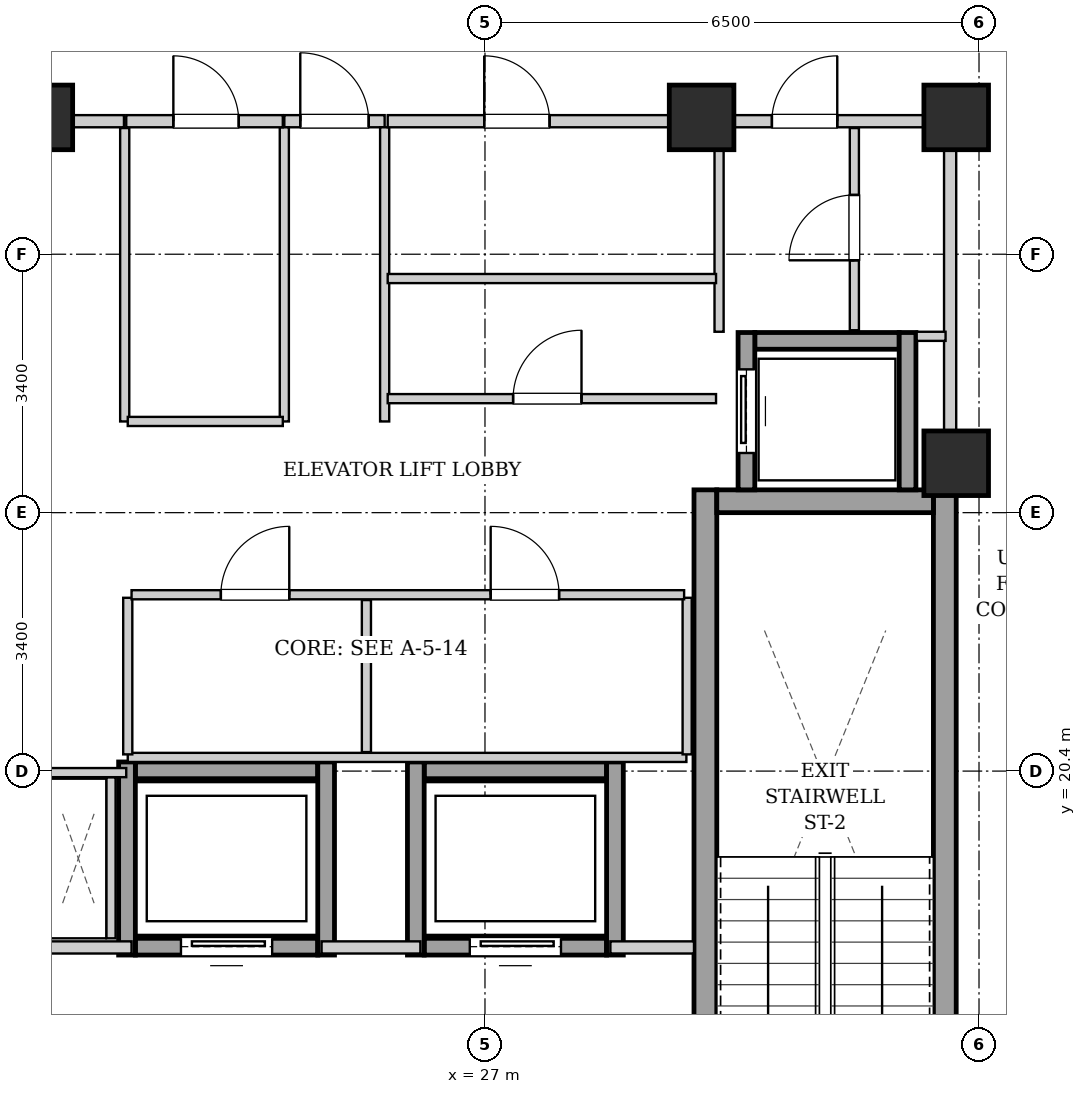
"""IFC4 building model, lengths in metres.
Left out: names, types, materials, properties, quantities, classifications, styles, units other than length and angle.
Written with IfcOpenShell. Run it as: python <this file> out.ifc"""

import sys

from ifc_helpers import new_model, si_unit, direction, frame, frame_2d, origin, origin_2d, place, context, subcontext, project, spatial, rectangle, extrude, element, fill, save


model = new_model("IFC4")
c1 = context("Model", 3, precision=1e-05, world=origin(), true_north=direction((0.0, 1.0)))
c2 = subcontext(c1, "Body", "Model", "MODEL_VIEW")
j1 = project(units=[si_unit("LENGTHUNIT", "METRE"), si_unit("PLANEANGLEUNIT", "RADIAN")], contexts=[c1])
p1 = place(None, origin())
s1 = spatial("IfcSite", under=j1, at=p1, CompositionType="ELEMENT")
p2 = place(p1, origin())
s2 = spatial("IfcBuilding", under=s1, at=p2, CompositionType="ELEMENT")
p3 = place(p2, frame((0.0, 0.0, 210.7)))
s3 = spatial("IfcBuildingStorey", under=s2, at=p3, CompositionType="ELEMENT", Elevation=210.7)
for number, where, z_axis, x_axis in (
    (1, (21.15, 29.0, 0.0), (0.0, 0.0, 1.0), (1.0, 0.0, 0.0)),
    (2, (29.85, 29.0, 0.0), (0.0, 0.0, 1.0), (1.0, 0.0, 0.0)),
    (3, (33.2, 29.0, 0.0), (0.0, 0.0, 1.0), (1.0, 0.0, 0.0)),
    (4, (33.2, 24.45, 0.0), (0.0, 0.0, 1.0), (1.0, 0.0, 0.0)),
):
    element("IfcColumn", number, at=place(p3, frame(where, z_axis=z_axis, x_axis=x_axis)), inside=s3, PredefinedType="COLUMN", context=c2, shape_type="SweptSolid", body=[
        extrude(rectangle(XDim=0.85, YDim=0.85, at=origin_2d()), origin(), (0.0, 0.0, 1.0), 3.3),
    ])
for number, where, z_axis, x_axis in (
    (5, (29.9, 15.1, 0.0), (0.0, 0.0, 1.0), (0.0, 1.0, 0.0)),
    (6, (33.05, 15.1, 0.0), (0.0, 0.0, 1.0), (0.0, 1.0, 0.0)),
):
    element("IfcWall", number, at=place(p3, frame(where, z_axis=z_axis, x_axis=x_axis)), inside=s3, PredefinedType="SHEAR", context=c2, shape_type="SweptSolid", body=[
        extrude(rectangle(XDim=9.0, YDim=0.3, at=frame_2d((4.5, 0.0))), origin(), (0.0, 0.0, 1.0), 3.04),
    ])
p4 = place(p3, frame((30.05, 23.95, 0.0), z_axis=(0.0, 0.0, 1.0), x_axis=(1.0, 0.0, 0.0)))
e7 = element("IfcWall", 7, at=p4, inside=s3, PredefinedType="SHEAR", context=c2, shape_type="SweptSolid", body=[
    extrude(rectangle(XDim=2.85, YDim=0.3, at=frame_2d((1.425, 0.0))), origin(), (0.0, 0.0, 1.0), 3.04),
])
p5 = place(p3, frame((30.55, 26.06, 0.0), z_axis=(0.0, 0.0, 1.0), x_axis=(1.0, 0.0, 0.0)))
e8 = element("IfcWall", 8, at=p5, inside=s3, PredefinedType="SHEAR", context=c2, shape_type="SweptSolid", body=[
    extrude(rectangle(XDim=1.9, YDim=0.22, at=frame_2d((0.95, 0.0))), origin(), (0.0, 0.0, 1.0), 3.04),
])
p6 = place(p3, frame((30.44, 24.1, 0.0), z_axis=(0.0, 0.0, 1.0), x_axis=(0.0, 1.0, 0.0)))
e9 = element("IfcWall", 9, at=p6, inside=s3, PredefinedType="SHEAR", context=c2, shape_type="SweptSolid", body=[
    extrude(rectangle(XDim=2.07, YDim=0.22, at=frame_2d((1.035, 0.0))), origin(), (0.0, 0.0, 1.0), 3.04),
])
p7 = place(p6, frame((0.485, 0.0, 0.0)))
e10 = element("IfcOpeningElement", 10, at=p7, cuts=e9, PredefinedType="OPENING", context=c2, shape_type="SweptSolid", body=[
    extrude(rectangle(XDim=1.1, YDim=2.15, at=frame_2d((0.55, 1.075))), frame((0.0, 0.12, 0.0), z_axis=(0.0, -1.0, 0.0), x_axis=(1.0, 0.0, 0.0)), (0.0, 0.0, 1.0), 0.24),
])
p8 = place(p3, frame((32.56, 24.1, 0.0), z_axis=(0.0, 0.0, 1.0), x_axis=(0.0, 1.0, 0.0)))
e11 = element("IfcWall", 11, at=p8, inside=s3, PredefinedType="SHEAR", context=c2, shape_type="SweptSolid", body=[
    extrude(rectangle(XDim=2.07, YDim=0.22, at=frame_2d((1.035, 0.0))), origin(), (0.0, 0.0, 1.0), 3.04),
])
p9 = place(p3, frame((22.4, 18.09, 0.0), z_axis=(0.0, 0.0, 1.0), x_axis=(1.0, 0.0, 0.0)))
e12 = element("IfcWall", 12, at=p9, inside=s3, PredefinedType="SHEAR", context=c2, shape_type="SweptSolid", body=[
    extrude(rectangle(XDim=2.4, YDim=0.22, at=frame_2d((1.2, 0.0))), origin(), (0.0, 0.0, 1.0), 3.04),
])
p10 = place(p9, frame((0.6, 0.0, 0.0)))
e13 = element("IfcOpeningElement", 13, at=p10, cuts=e12, PredefinedType="OPENING", context=c2, shape_type="SweptSolid", body=[
    extrude(rectangle(XDim=1.2, YDim=2.15, at=frame_2d((0.6, 1.075))), frame((0.0, 0.12, 0.0), z_axis=(0.0, -1.0, 0.0), x_axis=(1.0, 0.0, 0.0)), (0.0, 0.0, 1.0), 0.24),
])
p11 = place(p3, frame((22.4, 20.41, 0.0), z_axis=(0.0, 0.0, 1.0), x_axis=(1.0, 0.0, 0.0)))
e14 = element("IfcWall", 14, at=p11, inside=s3, PredefinedType="SHEAR", context=c2, shape_type="SweptSolid", body=[
    extrude(rectangle(XDim=2.4, YDim=0.22, at=frame_2d((1.2, 0.0))), origin(), (0.0, 0.0, 1.0), 3.04),
])
for number, where, z_axis, x_axis in (
    (15, (22.29, 17.98, 0.0), (0.0, 0.0, 1.0), (0.0, 1.0, 0.0)),
    (16, (24.91, 17.98, 0.0), (0.0, 0.0, 1.0), (0.0, 1.0, 0.0)),
):
    element("IfcWall", number, at=place(p3, frame(where, z_axis=z_axis, x_axis=x_axis)), inside=s3, PredefinedType="SHEAR", context=c2, shape_type="SweptSolid", body=[
        extrude(rectangle(XDim=2.54, YDim=0.22, at=frame_2d((1.27, 0.0))), origin(), (0.0, 0.0, 1.0), 3.04),
    ])
p12 = place(p3, frame((26.2, 18.09, 0.0), z_axis=(0.0, 0.0, 1.0), x_axis=(1.0, 0.0, 0.0)))
e17 = element("IfcWall", 17, at=p12, inside=s3, PredefinedType="SHEAR", context=c2, shape_type="SweptSolid", body=[
    extrude(rectangle(XDim=2.4, YDim=0.22, at=frame_2d((1.2, 0.0))), origin(), (0.0, 0.0, 1.0), 3.04),
])
p13 = place(p12, frame((0.6, 0.0, 0.0)))
e18 = element("IfcOpeningElement", 18, at=p13, cuts=e17, PredefinedType="OPENING", context=c2, shape_type="SweptSolid", body=[
    extrude(rectangle(XDim=1.2, YDim=2.15, at=frame_2d((0.6, 1.075))), frame((0.0, 0.12, 0.0), z_axis=(0.0, -1.0, 0.0), x_axis=(1.0, 0.0, 0.0)), (0.0, 0.0, 1.0), 0.24),
])
p14 = place(p3, frame((26.2, 20.41, 0.0), z_axis=(0.0, 0.0, 1.0), x_axis=(1.0, 0.0, 0.0)))
e19 = element("IfcWall", 19, at=p14, inside=s3, PredefinedType="SHEAR", context=c2, shape_type="SweptSolid", body=[
    extrude(rectangle(XDim=2.4, YDim=0.22, at=frame_2d((1.2, 0.0))), origin(), (0.0, 0.0, 1.0), 3.04),
])
for number, where, z_axis, x_axis in (
    (20, (26.09, 17.98, 0.0), (0.0, 0.0, 1.0), (0.0, 1.0, 0.0)),
    (21, (28.71, 17.98, 0.0), (0.0, 0.0, 1.0), (0.0, 1.0, 0.0)),
):
    element("IfcWall", number, at=place(p3, frame(where, z_axis=z_axis, x_axis=x_axis)), inside=s3, PredefinedType="SHEAR", context=c2, shape_type="SweptSolid", body=[
        extrude(rectangle(XDim=2.54, YDim=0.22, at=frame_2d((1.27, 0.0))), origin(), (0.0, 0.0, 1.0), 3.04),
    ])
p15 = place(p3, frame((21.25, 18.08, 0.0), z_axis=(0.0, 0.0, 1.0), x_axis=(1.0, 0.0, 0.0)))
e22 = element("IfcWall", 22, at=p15, inside=s3, PredefinedType="PARTITIONING", context=c2, shape_type="SweptSolid", body=[
    extrude(rectangle(XDim=1.1, YDim=0.16, at=frame_2d((0.55, 0.0))), origin(), (0.0, 0.0, 1.0), 3.04),
])
p16 = place(p3, frame((24.85, 18.08, 0.0), z_axis=(0.0, 0.0, 1.0), x_axis=(1.0, 0.0, 0.0)))
e23 = element("IfcWall", 23, at=p16, inside=s3, PredefinedType="PARTITIONING", context=c2, shape_type="SweptSolid", body=[
    extrude(rectangle(XDim=1.3, YDim=0.16, at=frame_2d((0.65, 0.0))), origin(), (0.0, 0.0, 1.0), 3.04),
])
p17 = place(p3, frame((28.65, 18.08, 0.0), z_axis=(0.0, 0.0, 1.0), x_axis=(1.0, 0.0, 0.0)))
e24 = element("IfcWall", 24, at=p17, inside=s3, PredefinedType="PARTITIONING", context=c2, shape_type="SweptSolid", body=[
    extrude(rectangle(XDim=1.1, YDim=0.16, at=frame_2d((0.55, 0.0))), origin(), (0.0, 0.0, 1.0), 3.04),
])
p18 = place(p3, frame((33.12, 24.12, 0.0), z_axis=(0.0, 0.0, 1.0), x_axis=(0.0, 1.0, 0.0)))
e25 = element("IfcWall", 25, at=p18, inside=s3, PredefinedType="PARTITIONING", context=c2, shape_type="SweptSolid", body=[
    extrude(rectangle(XDim=4.76, YDim=0.16, at=frame_2d((2.38, 0.0))), origin(), (0.0, 0.0, 1.0), 3.04),
])
p19 = place(p3, frame((24.36, 28.95, 0.0), z_axis=(0.0, 0.0, 1.0), x_axis=(1.0, 0.0, 0.0)))
e26 = element("IfcWall", 26, at=p19, inside=s3, PredefinedType="PARTITIONING", context=c2, shape_type="SweptSolid", body=[
    extrude(rectangle(XDim=1.32, YDim=0.16, at=frame_2d((0.66, 0.0))), origin(), (0.0, 0.0, 1.0), 2.556),
])
p20 = place(p19, frame((0.21, 0.0, 0.0)))
e27 = element("IfcOpeningElement", 27, at=p20, cuts=e26, PredefinedType="OPENING", context=c2, shape_type="SweptSolid", body=[
    extrude(rectangle(XDim=0.9, YDim=2.05, at=frame_2d((0.45, 1.025))), frame((0.0, 0.09, 0.0), z_axis=(0.0, -1.0, 0.0), x_axis=(1.0, 0.0, 0.0)), (0.0, 0.0, 1.0), 0.18),
])
p21 = place(p3, frame((17.96, 28.95, 0.0), z_axis=(0.0, 0.0, 1.0), x_axis=(1.0, 0.0, 0.0)))
e28 = element("IfcWall", 28, at=p21, inside=s3, PredefinedType="PARTITIONING", context=c2, shape_type="SweptSolid", body=[
    extrude(rectangle(XDim=4.29, YDim=0.16, at=frame_2d((2.145, 0.0))), origin(), (0.0, 0.0, 1.0), 2.556),
])
p22 = place(p21, frame((1.715, 0.0, 0.0)))
e29 = element("IfcOpeningElement", 29, at=p22, cuts=e28, PredefinedType="OPENING", context=c2, shape_type="SweptSolid", body=[
    extrude(rectangle(XDim=0.86, YDim=2.05, at=frame_2d((0.43, 1.025))), frame((0.0, 0.09, 0.0), z_axis=(0.0, -1.0, 0.0), x_axis=(1.0, 0.0, 0.0)), (0.0, 0.0, 1.0), 0.18),
])
p23 = place(p3, frame((22.08, 18.2, 0.0), z_axis=(0.0, 0.0, 1.0), x_axis=(0.0, 1.0, 0.0)))
e30 = element("IfcWall", 30, at=p23, inside=s3, PredefinedType="PARTITIONING", context=c2, shape_type="SweptSolid", body=[
    extrude(rectangle(XDim=2.12, YDim=0.12, at=frame_2d((1.06, 0.0))), origin(), (0.0, 0.0, 1.0), 3.04),
])
p24 = place(p3, frame((22.28, 20.38, 0.0), z_axis=(0.0, 0.0, 1.0), x_axis=(-1.0, 0.0, 0.0)))
e31 = element("IfcWall", 31, at=p24, inside=s3, PredefinedType="PARTITIONING", context=c2, shape_type="SweptSolid", body=[
    extrude(rectangle(XDim=1.02, YDim=0.12, at=frame_2d((0.51, 0.0))), origin(), (0.0, 0.0, 1.0), 3.04),
])
for number, where, z_axis, x_axis in (
    (32, (24.36, 25.0, 0.0), (0.0, 0.0, 1.0), (0.0, 1.0, 0.0)),
    (33, (25.68, 25.0, 0.0), (0.0, 0.0, 1.0), (0.0, 1.0, 0.0)),
):
    element("IfcWall", number, at=place(p3, frame(where, z_axis=z_axis, x_axis=x_axis)), inside=s3, PredefinedType="PARTITIONING", context=c2, shape_type="SweptSolid", body=[
        extrude(rectangle(XDim=3.87, YDim=0.12, at=frame_2d((1.935, 0.0))), origin(), (0.0, 0.0, 1.0), 3.04),
    ])
p25 = place(p3, frame((30.08, 26.18, 0.0), z_axis=(0.0, 0.0, 1.0), x_axis=(0.0, 1.0, 0.0)))
e34 = element("IfcWall", 34, at=p25, inside=s3, PredefinedType="PARTITIONING", context=c2, shape_type="SweptSolid", body=[
    extrude(rectangle(XDim=2.68, YDim=0.12, at=frame_2d((1.34, 0.0))), origin(), (0.0, 0.0, 1.0), 3.04),
])
p26 = place(p3, frame((32.68, 26.12, 0.0), z_axis=(0.0, 0.0, 1.0), x_axis=(1.0, 0.0, 0.0)))
e35 = element("IfcWall", 35, at=p26, inside=s3, PredefinedType="PARTITIONING", context=c2, shape_type="SweptSolid", body=[
    extrude(rectangle(XDim=0.38, YDim=0.12, at=frame_2d((0.19, 0.0))), origin(), (0.0, 0.0, 1.0), 3.04),
])
p27 = place(p3, frame((31.86, 26.2, 0.0), z_axis=(0.0, 0.0, 1.0), x_axis=(0.0, 1.0, 0.0)))
e36 = element("IfcWall", 36, at=p27, inside=s3, PredefinedType="PARTITIONING", context=c2, shape_type="SweptSolid", body=[
    extrude(rectangle(XDim=2.66, YDim=0.12, at=frame_2d((1.33, 0.0))), origin(), (0.0, 0.0, 1.0), 3.04),
])
p28 = place(p27, frame((0.92, 0.0, 0.0)))
e37 = element("IfcOpeningElement", 37, at=p28, cuts=e36, PredefinedType="OPENING", context=c2, shape_type="SweptSolid", body=[
    extrude(rectangle(XDim=0.86, YDim=2.05, at=frame_2d((0.43, 1.025))), frame((0.0, 0.07, 0.0), z_axis=(0.0, -1.0, 0.0), x_axis=(1.0, 0.0, 0.0)), (0.0, 0.0, 1.0), 0.14),
])
p29 = place(p3, frame((30.08, 28.95, 0.0), z_axis=(0.0, 0.0, 1.0), x_axis=(1.0, 0.0, 0.0)))
e38 = element("IfcWall", 38, at=p29, inside=s3, PredefinedType="PARTITIONING", context=c2, shape_type="SweptSolid", body=[
    extrude(rectangle(XDim=2.96, YDim=0.16, at=frame_2d((1.48, 0.0))), origin(), (0.0, 0.0, 1.0), 3.04),
])
p30 = place(p29, frame((0.695, 0.0, 0.0)))
e39 = element("IfcOpeningElement", 39, at=p30, cuts=e38, PredefinedType="OPENING", context=c2, shape_type="SweptSolid", body=[
    extrude(rectangle(XDim=0.86, YDim=2.05, at=frame_2d((0.43, 1.025))), frame((0.0, 0.09, 0.0), z_axis=(0.0, -1.0, 0.0), x_axis=(1.0, 0.0, 0.0)), (0.0, 0.0, 1.0), 0.18),
])
p31 = place(p3, frame((22.26, 25.0, 0.0), z_axis=(0.0, 0.0, 1.0), x_axis=(0.0, 1.0, 0.0)))
e40 = element("IfcWall", 40, at=p31, inside=s3, PredefinedType="PARTITIONING", context=c2, shape_type="SweptSolid", body=[
    extrude(rectangle(XDim=3.86, YDim=0.12, at=frame_2d((1.93, 0.0))), origin(), (0.0, 0.0, 1.0), 3.04),
])
p32 = place(p3, frame((22.3, 25.0, 0.0), z_axis=(0.0, 0.0, 1.0), x_axis=(1.0, 0.0, 0.0)))
e41 = element("IfcWall", 41, at=p32, inside=s3, PredefinedType="PARTITIONING", context=c2, shape_type="SweptSolid", body=[
    extrude(rectangle(XDim=2.04, YDim=0.12, at=frame_2d((1.02, 0.0))), origin(), (0.0, 0.0, 1.0), 3.04),
])
p33 = place(p3, frame((22.28, 28.95, 0.0), z_axis=(0.0, 0.0, 1.0), x_axis=(1.0, 0.0, 0.0)))
e42 = element("IfcWall", 42, at=p33, inside=s3, PredefinedType="PARTITIONING", context=c2, shape_type="SweptSolid", body=[
    extrude(rectangle(XDim=2.06, YDim=0.16, at=frame_2d((1.03, 0.0))), origin(), (0.0, 0.0, 1.0), 2.556),
])
p34 = place(p33, frame((0.62, 0.0, 0.0)))
e43 = element("IfcOpeningElement", 43, at=p34, cuts=e42, PredefinedType="OPENING", context=c2, shape_type="SweptSolid", body=[
    extrude(rectangle(XDim=0.86, YDim=2.05, at=frame_2d((0.43, 1.025))), frame((0.0, 0.09, 0.0), z_axis=(0.0, -1.0, 0.0), x_axis=(1.0, 0.0, 0.0)), (0.0, 0.0, 1.0), 0.18),
])
p35 = place(p3, frame((25.72, 26.88, 0.0), z_axis=(0.0, 0.0, 1.0), x_axis=(1.0, 0.0, 0.0)))
e44 = element("IfcWall", 44, at=p35, inside=s3, PredefinedType="PARTITIONING", context=c2, shape_type="SweptSolid", body=[
    extrude(rectangle(XDim=4.32, YDim=0.12, at=frame_2d((2.16, 0.0))), origin(), (0.0, 0.0, 1.0), 3.04),
])
p36 = place(p3, frame((25.72, 25.3, 0.0), z_axis=(0.0, 0.0, 1.0), x_axis=(1.0, 0.0, 0.0)))
e45 = element("IfcWall", 45, at=p36, inside=s3, PredefinedType="PARTITIONING", context=c2, shape_type="SweptSolid", body=[
    extrude(rectangle(XDim=4.32, YDim=0.12, at=frame_2d((2.16, 0.0))), origin(), (0.0, 0.0, 1.0), 3.04),
])
p37 = place(p36, frame((1.65, 0.0, 0.0)))
e46 = element("IfcOpeningElement", 46, at=p37, cuts=e45, PredefinedType="OPENING", context=c2, shape_type="SweptSolid", body=[
    extrude(rectangle(XDim=0.9, YDim=2.05, at=frame_2d((0.45, 1.025))), frame((0.0, 0.07, 0.0), z_axis=(0.0, -1.0, 0.0), x_axis=(1.0, 0.0, 0.0)), (0.0, 0.0, 1.0), 0.14),
])
p38 = place(p3, frame((25.72, 28.95, 0.0), z_axis=(0.0, 0.0, 1.0), x_axis=(1.0, 0.0, 0.0)))
e47 = element("IfcWall", 47, at=p38, inside=s3, PredefinedType="PARTITIONING", context=c2, shape_type="SweptSolid", body=[
    extrude(rectangle(XDim=4.32, YDim=0.16, at=frame_2d((2.16, 0.0))), origin(), (0.0, 0.0, 1.0), 2.556),
])
p39 = place(p38, frame((1.27, 0.0, 0.0)))
e48 = element("IfcOpeningElement", 48, at=p39, cuts=e47, PredefinedType="OPENING", context=c2, shape_type="SweptSolid", body=[
    extrude(rectangle(XDim=0.86, YDim=2.05, at=frame_2d((0.43, 1.025))), frame((0.0, 0.09, 0.0), z_axis=(0.0, -1.0, 0.0), x_axis=(1.0, 0.0, 0.0)), (0.0, 0.0, 1.0), 0.18),
])
p40 = place(p3, frame((22.3, 20.58, 0.0), z_axis=(0.0, 0.0, 1.0), x_axis=(1.0, 0.0, 0.0)))
e49 = element("IfcWall", 49, at=p40, inside=s3, PredefinedType="PARTITIONING", context=c2, shape_type="SweptSolid", body=[
    extrude(rectangle(XDim=7.35, YDim=0.12, at=frame_2d((3.675, 0.0))), origin(), (0.0, 0.0, 1.0), 3.04),
])
for number, where, z_axis, x_axis in (
    (50, (22.3, 20.62, 0.0), (0.0, 0.0, 1.0), (0.0, 1.0, 0.0)),
    (51, (29.66, 20.62, 0.0), (0.0, 0.0, 1.0), (0.0, 1.0, 0.0)),
):
    element("IfcWall", number, at=place(p3, frame(where, z_axis=z_axis, x_axis=x_axis)), inside=s3, PredefinedType="PARTITIONING", context=c2, shape_type="SweptSolid", body=[
        extrude(rectangle(XDim=2.06, YDim=0.12, at=frame_2d((1.03, 0.0))), origin(), (0.0, 0.0, 1.0), 3.04),
    ])
p41 = place(p3, frame((25.44, 20.65, 0.0), z_axis=(0.0, 0.0, 1.0), x_axis=(0.0, 1.0, 0.0)))
e52 = element("IfcWall", 52, at=p41, inside=s3, PredefinedType="PARTITIONING", context=c2, shape_type="SweptSolid", body=[
    extrude(rectangle(XDim=2.0, YDim=0.12, at=frame_2d((1.0, 0.0))), origin(), (0.0, 0.0, 1.0), 3.04),
])
p42 = place(p3, frame((22.35, 22.72, 0.0), z_axis=(0.0, 0.0, 1.0), x_axis=(1.0, 0.0, 0.0)))
e53 = element("IfcWall", 53, at=p42, inside=s3, PredefinedType="PARTITIONING", context=c2, shape_type="SweptSolid", body=[
    extrude(rectangle(XDim=7.27, YDim=0.12, at=frame_2d((3.635, 0.0))), origin(), (0.0, 0.0, 1.0), 3.04),
])
p43 = place(p42, frame((1.175, 0.0, 0.0)))
e54 = element("IfcOpeningElement", 54, at=p43, cuts=e53, PredefinedType="OPENING", context=c2, shape_type="SweptSolid", body=[
    extrude(rectangle(XDim=0.9, YDim=2.05, at=frame_2d((0.45, 1.025))), frame((0.0, 0.07, 0.0), z_axis=(0.0, -1.0, 0.0), x_axis=(1.0, 0.0, 0.0)), (0.0, 0.0, 1.0), 0.14),
])
p44 = place(p42, frame((4.725, 0.0, 0.0)))
e55 = element("IfcOpeningElement", 55, at=p44, cuts=e53, PredefinedType="OPENING", context=c2, shape_type="SweptSolid", body=[
    extrude(rectangle(XDim=0.9, YDim=2.05, at=frame_2d((0.45, 1.025))), frame((0.0, 0.07, 0.0), z_axis=(0.0, -1.0, 0.0), x_axis=(1.0, 0.0, 0.0)), (0.0, 0.0, 1.0), 0.14),
])
p45 = place(p7, origin())
e56 = element("IfcDoor", 56, at=p45, inside=s3, OperationType="SLIDING_TO_LEFT", PredefinedType="DOOR", context=c2, shape_type="SweptSolid", body=[
    extrude(rectangle(XDim=1.1, YDim=2.15, at=frame_2d((0.55, 1.075))), frame((0.0, 0.025, 0.0), z_axis=(0.0, -1.0, 0.0), x_axis=(1.0, 0.0, 0.0)), (0.0, 0.0, 1.0), 0.05),
])
fill(e10, e56)
p46 = place(p10, origin())
e57 = element("IfcDoor", 57, at=p46, inside=s3, OperationType="SLIDING_TO_LEFT", PredefinedType="DOOR", context=c2, shape_type="SweptSolid", body=[
    extrude(rectangle(XDim=1.2, YDim=2.15, at=frame_2d((0.6, 1.075))), frame((0.0, 0.025, 0.0), z_axis=(0.0, -1.0, 0.0), x_axis=(1.0, 0.0, 0.0)), (0.0, 0.0, 1.0), 0.05),
])
fill(e13, e57)
p47 = place(p13, origin())
e58 = element("IfcDoor", 58, at=p47, inside=s3, OperationType="SLIDING_TO_LEFT", PredefinedType="DOOR", context=c2, shape_type="SweptSolid", body=[
    extrude(rectangle(XDim=1.2, YDim=2.15, at=frame_2d((0.6, 1.075))), frame((0.0, 0.025, 0.0), z_axis=(0.0, -1.0, 0.0), x_axis=(1.0, 0.0, 0.0)), (0.0, 0.0, 1.0), 0.05),
])
fill(e18, e58)
p48 = place(p20, origin())
e59 = element("IfcDoor", 59, at=p48, inside=s3, OperationType="SINGLE_SWING_LEFT", PredefinedType="DOOR", context=c2, shape_type="SweptSolid", body=[
    extrude(rectangle(XDim=0.9, YDim=2.05, at=frame_2d((0.45, 1.025))), frame((0.0, 0.025, 0.0), z_axis=(0.0, -1.0, 0.0), x_axis=(1.0, 0.0, 0.0)), (0.0, 0.0, 1.0), 0.05),
])
fill(e27, e59)
p49 = place(p28, origin())
e60 = element("IfcDoor", 60, at=p49, inside=s3, OperationType="SINGLE_SWING_LEFT", PredefinedType="DOOR", context=c2, shape_type="SweptSolid", body=[
    extrude(rectangle(XDim=0.86, YDim=2.05, at=frame_2d((0.43, 1.025))), frame((0.0, 0.025, 0.0), z_axis=(0.0, -1.0, 0.0), x_axis=(1.0, 0.0, 0.0)), (0.0, 0.0, 1.0), 0.05),
])
fill(e37, e60)
p50 = place(p30, origin())
e61 = element("IfcDoor", 61, at=p50, inside=s3, OperationType="SINGLE_SWING_RIGHT", PredefinedType="DOOR", context=c2, shape_type="SweptSolid", body=[
    extrude(rectangle(XDim=0.86, YDim=2.05, at=frame_2d((0.43, 1.025))), frame((0.0, 0.025, 0.0), z_axis=(0.0, -1.0, 0.0), x_axis=(1.0, 0.0, 0.0)), (0.0, 0.0, 1.0), 0.05),
])
fill(e39, e61)
p51 = place(p34, origin())
e62 = element("IfcDoor", 62, at=p51, inside=s3, OperationType="SINGLE_SWING_LEFT", PredefinedType="DOOR", context=c2, shape_type="SweptSolid", body=[
    extrude(rectangle(XDim=0.86, YDim=2.05, at=frame_2d((0.43, 1.025))), frame((0.0, 0.025, 0.0), z_axis=(0.0, -1.0, 0.0), x_axis=(1.0, 0.0, 0.0)), (0.0, 0.0, 1.0), 0.05),
])
fill(e43, e62)
p52 = place(p37, origin())
e63 = element("IfcDoor", 63, at=p52, inside=s3, OperationType="SINGLE_SWING_RIGHT", PredefinedType="DOOR", context=c2, shape_type="SweptSolid", body=[
    extrude(rectangle(XDim=0.9, YDim=2.05, at=frame_2d((0.45, 1.025))), frame((0.0, 0.025, 0.0), z_axis=(0.0, -1.0, 0.0), x_axis=(1.0, 0.0, 0.0)), (0.0, 0.0, 1.0), 0.05),
])
fill(e46, e63)
p53 = place(p39, origin())
e64 = element("IfcDoor", 64, at=p53, inside=s3, OperationType="SINGLE_SWING_LEFT", PredefinedType="DOOR", context=c2, shape_type="SweptSolid", body=[
    extrude(rectangle(XDim=0.86, YDim=2.05, at=frame_2d((0.43, 1.025))), frame((0.0, 0.025, 0.0), z_axis=(0.0, -1.0, 0.0), x_axis=(1.0, 0.0, 0.0)), (0.0, 0.0, 1.0), 0.05),
])
fill(e48, e64)
p54 = place(p43, origin())
e65 = element("IfcDoor", 65, at=p54, inside=s3, OperationType="SINGLE_SWING_RIGHT", PredefinedType="DOOR", context=c2, shape_type="SweptSolid", body=[
    extrude(rectangle(XDim=0.9, YDim=2.05, at=frame_2d((0.45, 1.025))), frame((0.0, 0.025, 0.0), z_axis=(0.0, -1.0, 0.0), x_axis=(1.0, 0.0, 0.0)), (0.0, 0.0, 1.0), 0.05),
])
fill(e54, e65)
p55 = place(p44, origin())
e66 = element("IfcDoor", 66, at=p55, inside=s3, OperationType="SINGLE_SWING_LEFT", PredefinedType="DOOR", context=c2, shape_type="SweptSolid", body=[
    extrude(rectangle(XDim=0.9, YDim=2.05, at=frame_2d((0.45, 1.025))), frame((0.0, 0.025, 0.0), z_axis=(0.0, -1.0, 0.0), x_axis=(1.0, 0.0, 0.0)), (0.0, 0.0, 1.0), 0.05),
])
fill(e55, e66)
save(model, sys.argv[1])
